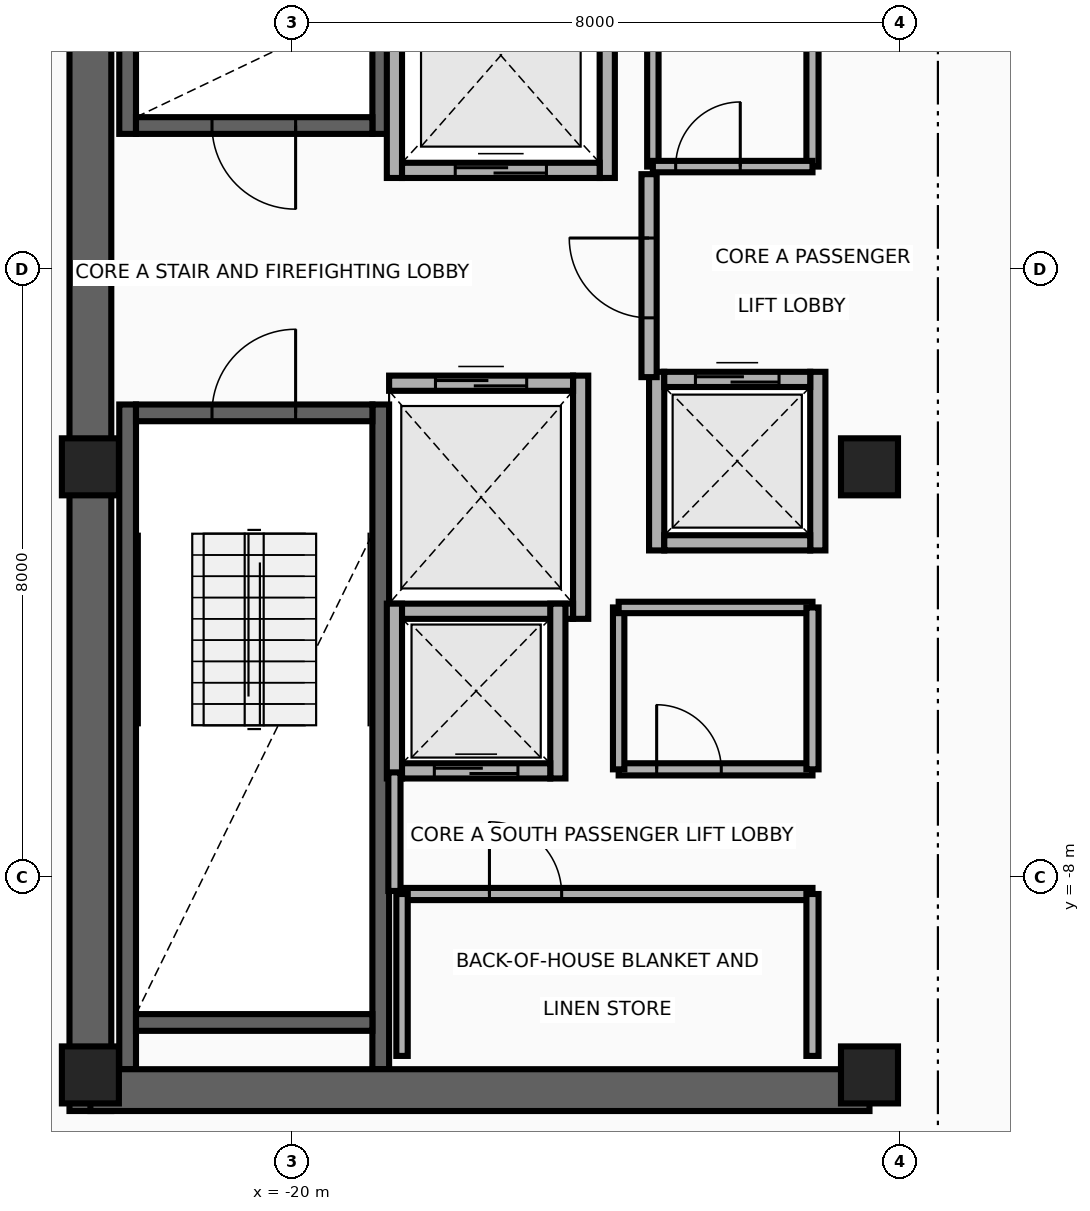
"""IFC4 building model, lengths in metres.
Left out: names, types, materials, properties, quantities, classifications, styles, units other than length and angle.
Written with IfcOpenShell. Run it as: python <this file> out.ifc"""

import sys

from ifc_helpers import new_model, si_unit, direction, frame, frame_2d, origin, origin_2d, place, context, subcontext, project, spatial, rectangle, extrude, source, transform, mapped, element, fill, save


model = new_model("IFC4")
c1 = context("Model", 3, precision=1e-05, world=origin(), true_north=direction((0.0, 1.0)))
c2 = subcontext(c1, "Body", "Model", "MODEL_VIEW")
j1 = project(units=[si_unit("LENGTHUNIT", "METRE"), si_unit("PLANEANGLEUNIT", "RADIAN")], contexts=[c1])
p1 = place(None, origin())
s1 = spatial("IfcSite", under=j1, at=p1, CompositionType="ELEMENT")
p2 = place(p1, origin())
s2 = spatial("IfcBuilding", under=s1, at=p2, CompositionType="ELEMENT")
p3 = place(p2, frame((0.0, 0.0, 290.6)))
s3 = spatial("IfcBuildingStorey", under=s2, at=p3, CompositionType="ELEMENT", Elevation=290.6)
for number, where, z_axis, x_axis in (
    (1, (-22.16, 1.78, 0.0), (0.0, 0.0, 1.0), (0.0, 1.0, 0.0)),
    (2, (-18.83, 1.78, 0.0), (0.0, 0.0, 1.0), (0.0, 1.0, 0.0)),
):
    element("IfcWall", number, at=place(p3, frame(where, z_axis=z_axis, x_axis=x_axis)), inside=s3, PredefinedType="SHEAR", context=c2, shape_type="SweptSolid", body=[
        extrude(rectangle(XDim=8.745, YDim=0.22, at=frame_2d((4.373, 0.0))), origin(), (0.0, 0.0, 1.0), 3.36),
    ])
p4 = place(p3, frame((-22.05, 1.89, 0.0), z_axis=(0.0, 0.0, 1.0), x_axis=(1.0, 0.0, 0.0)))
e3 = element("IfcWall", 3, at=p4, inside=s3, PredefinedType="SHEAR", context=c2, shape_type="SweptSolid", body=[
    extrude(rectangle(XDim=3.11, YDim=0.22, at=frame_2d((1.555, 0.0))), origin(), (0.0, 0.0, 1.0), 3.36),
])
p5 = place(p4, frame((1.0, 0.0, 0.0)))
e4 = element("IfcOpeningElement", 4, at=p5, cuts=e3, PredefinedType="OPENING", context=c2, shape_type="SweptSolid", body=[
    extrude(rectangle(XDim=1.1, YDim=2.15, at=frame_2d((0.55, 1.075))), frame((0.0, 0.125, 0.0), z_axis=(0.0, -1.0, 0.0), x_axis=(1.0, 0.0, 0.0)), (0.0, 0.0, 1.0), 0.25),
])
for number, where, z_axis, x_axis in (
    (5, (-22.16, -10.525, 0.0), (0.0, 0.0, 1.0), (0.0, 1.0, 0.0)),
    (6, (-18.83, -10.525, 0.0), (0.0, 0.0, 1.0), (0.0, 1.0, 0.0)),
):
    element("IfcWall", number, at=place(p3, frame(where, z_axis=z_axis, x_axis=x_axis)), inside=s3, PredefinedType="SHEAR", context=c2, shape_type="SweptSolid", body=[
        extrude(rectangle(XDim=8.745, YDim=0.22, at=frame_2d((4.373, 0.0))), origin(), (0.0, 0.0, 1.0), 3.36),
    ])
p6 = place(p3, frame((-22.05, -9.91, 0.0), z_axis=(0.0, 0.0, 1.0), x_axis=(1.0, 0.0, 0.0)))
e7 = element("IfcWall", 7, at=p6, inside=s3, PredefinedType="SHEAR", context=c2, shape_type="SweptSolid", body=[
    extrude(rectangle(XDim=3.11, YDim=0.22, at=frame_2d((1.555, 0.0))), origin(), (0.0, 0.0, 1.0), 3.36),
])
p7 = place(p3, frame((-22.05, -1.89, 0.0), z_axis=(0.0, 0.0, 1.0), x_axis=(1.0, 0.0, 0.0)))
e8 = element("IfcWall", 8, at=p7, inside=s3, PredefinedType="SHEAR", context=c2, shape_type="SweptSolid", body=[
    extrude(rectangle(XDim=3.11, YDim=0.22, at=frame_2d((1.555, 0.0))), origin(), (0.0, 0.0, 1.0), 3.36),
])
p8 = place(p7, frame((1.0, 0.0, 0.0)))
e9 = element("IfcOpeningElement", 9, at=p8, cuts=e8, PredefinedType="OPENING", context=c2, shape_type="SweptSolid", body=[
    extrude(rectangle(XDim=1.1, YDim=2.15, at=frame_2d((0.55, 1.075))), frame((0.0, 0.125, 0.0), z_axis=(0.0, -1.0, 0.0), x_axis=(1.0, 0.0, 0.0)), (0.0, 0.0, 1.0), 0.25),
])
p9 = place(p3, frame((-22.65, -11.075, 0.0), z_axis=(0.0, 0.0, 1.0), x_axis=(0.0, 1.0, 0.0)))
e10 = element("IfcWall", 10, at=p9, inside=s3, PredefinedType="SHEAR", context=c2, shape_type="SweptSolid", body=[
    extrude(rectangle(XDim=22.15, YDim=0.55, at=frame_2d((11.075, 0.0))), origin(), (0.0, 0.0, 1.0), 3.36),
])
p10 = place(p3, frame((-22.65, -10.8, 0.0), z_axis=(0.0, 0.0, 1.0), x_axis=(1.0, 0.0, 0.0)))
e11 = element("IfcWall", 11, at=p10, inside=s3, PredefinedType="SHEAR", context=c2, shape_type="SweptSolid", body=[
    extrude(rectangle(XDim=10.25, YDim=0.55, at=frame_2d((5.125, 0.0))), origin(), (0.0, 0.0, 1.0), 3.36),
])
m1 = source(origin(), c2, "Body", "SweptSolid", [
    extrude(rectangle(XDim=0.75, YDim=0.75, at=origin_2d()), origin(), (0.0, 0.0, 1.0), 3.6),
])
for number, where, z_axis, x_axis in (
    (12, (-22.65, -10.6, 0.0), (0.0, 0.0, 1.0), (1.0, 0.0, 0.0)),
    (13, (-12.4, -10.6, 0.0), (0.0, 0.0, 1.0), (1.0, 0.0, 0.0)),
    (14, (-22.65, -2.6, 0.0), (0.0, 0.0, 1.0), (1.0, 0.0, 0.0)),
    (15, (-12.4, -2.6, 0.0), (0.0, 0.0, 1.0), (1.0, 0.0, 0.0)),
):
    element("IfcColumn", number, at=place(p3, frame(where, z_axis=z_axis, x_axis=x_axis)), inside=s3, PredefinedType="COLUMN", context=c2, shape_type="MappedRepresentation", body=[
        mapped(m1, transform((0.0, 0.0, 0.0), x_axis=(1.0, 0.0, 0.0), y_axis=(0.0, 1.0, 0.0), z_axis=(0.0, 0.0, 1.0), scale=1.0)),
    ])
for number, where, z_axis, x_axis in (
    (16, (-18.65, 1.2, 0.0), (0.0, 0.0, 1.0), (0.0, 1.0, 0.0)),
    (17, (-15.85, 1.2, 0.0), (0.0, 0.0, 1.0), (0.0, 1.0, 0.0)),
):
    element("IfcWall", number, at=place(p3, frame(where, z_axis=z_axis, x_axis=x_axis)), inside=s3, PredefinedType="MOVABLE", context=c2, shape_type="SweptSolid", body=[
        extrude(rectangle(XDim=3.225, YDim=0.2, at=frame_2d((1.613, 0.0))), origin(), (0.0, 0.0, 1.0), 3.36),
    ])
p11 = place(p3, frame((-18.55, 1.3, 0.0), z_axis=(0.0, 0.0, 1.0), x_axis=(1.0, 0.0, 0.0)))
e18 = element("IfcWall", 18, at=p11, inside=s3, PredefinedType="MOVABLE", context=c2, shape_type="SweptSolid", body=[
    extrude(rectangle(XDim=2.6, YDim=0.2, at=frame_2d((1.3, 0.0))), origin(), (0.0, 0.0, 1.0), 3.36),
])
p12 = place(p11, frame((0.7, 0.0, 0.0)))
e19 = element("IfcOpeningElement", 19, at=p12, cuts=e18, PredefinedType="OPENING", context=c2, shape_type="SweptSolid", body=[
    extrude(rectangle(XDim=1.2, YDim=2.1, at=frame_2d((0.6, 1.05))), frame((0.0, 0.115, 0.0), z_axis=(0.0, -1.0, 0.0), x_axis=(1.0, 0.0, 0.0)), (0.0, 0.0, 1.0), 0.23),
])
p13 = place(p3, frame((-16.2, -4.6, 0.0), z_axis=(0.0, 0.0, 1.0), x_axis=(0.0, 1.0, 0.0)))
e20 = element("IfcWall", 20, at=p13, inside=s3, PredefinedType="MOVABLE", context=c2, shape_type="SweptSolid", body=[
    extrude(rectangle(XDim=3.2, YDim=0.2, at=frame_2d((1.6, 0.0))), origin(), (0.0, 0.0, 1.0), 3.36),
])
p14 = place(p3, frame((-18.72, -4.5, 0.0), z_axis=(0.0, 0.0, 1.0), x_axis=(1.0, 0.0, 0.0)))
e21 = element("IfcWall", 21, at=p14, inside=s3, PredefinedType="MOVABLE", context=c2, shape_type="SweptSolid", body=[
    extrude(rectangle(XDim=2.42, YDim=0.2, at=frame_2d((1.21, 0.0))), origin(), (0.0, 0.0, 1.0), 3.36),
])
p15 = place(p3, frame((-18.72, -1.5, 0.0), z_axis=(0.0, 0.0, 1.0), x_axis=(1.0, 0.0, 0.0)))
e22 = element("IfcWall", 22, at=p15, inside=s3, PredefinedType="MOVABLE", context=c2, shape_type="SweptSolid", body=[
    extrude(rectangle(XDim=2.42, YDim=0.2, at=frame_2d((1.21, 0.0))), origin(), (0.0, 0.0, 1.0), 3.36),
])
p16 = place(p15, frame((0.61, 0.0, 0.0)))
e23 = element("IfcOpeningElement", 23, at=p16, cuts=e22, PredefinedType="OPENING", context=c2, shape_type="SweptSolid", body=[
    extrude(rectangle(XDim=1.2, YDim=2.1, at=frame_2d((0.6, 1.05))), frame((0.0, 0.115, 0.0), z_axis=(0.0, -1.0, 0.0), x_axis=(1.0, 0.0, 0.0)), (0.0, 0.0, 1.0), 0.23),
])
for number, where, z_axis, x_axis in (
    (24, (-18.65, -6.7, 0.0), (0.0, 0.0, 1.0), (0.0, 1.0, 0.0)),
    (25, (-16.5, -6.7, 0.0), (0.0, 0.0, 1.0), (0.0, 1.0, 0.0)),
):
    element("IfcWall", number, at=place(p3, frame(where, z_axis=z_axis, x_axis=x_axis)), inside=s3, PredefinedType="MOVABLE", context=c2, shape_type="SweptSolid", body=[
        extrude(rectangle(XDim=2.3, YDim=0.2, at=frame_2d((1.15, 0.0))), origin(), (0.0, 0.0, 1.0), 3.36),
    ])
p17 = place(p3, frame((-18.55, -6.6, 0.0), z_axis=(0.0, 0.0, 1.0), x_axis=(1.0, 0.0, 0.0)))
e26 = element("IfcWall", 26, at=p17, inside=s3, PredefinedType="MOVABLE", context=c2, shape_type="SweptSolid", body=[
    extrude(rectangle(XDim=1.95, YDim=0.2, at=frame_2d((0.975, 0.0))), origin(), (0.0, 0.0, 1.0), 3.36),
])
p18 = place(p17, frame((0.425, 0.0, 0.0)))
e27 = element("IfcOpeningElement", 27, at=p18, cuts=e26, PredefinedType="OPENING", context=c2, shape_type="SweptSolid", body=[
    extrude(rectangle(XDim=1.1, YDim=2.1, at=frame_2d((0.55, 1.05))), frame((0.0, 0.115, 0.0), z_axis=(0.0, -1.0, 0.0), x_axis=(1.0, 0.0, 0.0)), (0.0, 0.0, 1.0), 0.23),
])
for number, where, z_axis, x_axis in (
    (28, (-15.2, -3.7, 0.0), (0.0, 0.0, 1.0), (0.0, 1.0, 0.0)),
    (29, (-13.08, -3.7, 0.0), (0.0, 0.0, 1.0), (0.0, 1.0, 0.0)),
):
    element("IfcWall", number, at=place(p3, frame(where, z_axis=z_axis, x_axis=x_axis)), inside=s3, PredefinedType="MOVABLE", context=c2, shape_type="SweptSolid", body=[
        extrude(rectangle(XDim=2.35, YDim=0.2, at=frame_2d((1.175, 0.0))), origin(), (0.0, 0.0, 1.0), 3.36),
    ])
p19 = place(p3, frame((-15.1, -3.6, 0.0), z_axis=(0.0, 0.0, 1.0), x_axis=(1.0, 0.0, 0.0)))
e30 = element("IfcWall", 30, at=p19, inside=s3, PredefinedType="MOVABLE", context=c2, shape_type="SweptSolid", body=[
    extrude(rectangle(XDim=1.92, YDim=0.2, at=frame_2d((0.96, 0.0))), origin(), (0.0, 0.0, 1.0), 3.36),
])
p20 = place(p3, frame((-15.1, -1.45, 0.0), z_axis=(0.0, 0.0, 1.0), x_axis=(1.0, 0.0, 0.0)))
e31 = element("IfcWall", 31, at=p20, inside=s3, PredefinedType="MOVABLE", context=c2, shape_type="SweptSolid", body=[
    extrude(rectangle(XDim=1.92, YDim=0.2, at=frame_2d((0.96, 0.0))), origin(), (0.0, 0.0, 1.0), 3.36),
])
p21 = place(p20, frame((0.41, 0.0, 0.0)))
e32 = element("IfcOpeningElement", 32, at=p21, cuts=e31, PredefinedType="OPENING", context=c2, shape_type="SweptSolid", body=[
    extrude(rectangle(XDim=1.1, YDim=2.1, at=frame_2d((0.55, 1.05))), frame((0.0, 0.115, 0.0), z_axis=(0.0, -1.0, 0.0), x_axis=(1.0, 0.0, 0.0)), (0.0, 0.0, 1.0), 0.23),
])
p22 = place(p3, frame((-15.3, -1.42, 0.0), z_axis=(0.0, 0.0, 1.0), x_axis=(0.0, 1.0, 0.0)))
e33 = element("IfcWall", 33, at=p22, inside=s3, PredefinedType="PARTITIONING", context=c2, shape_type="SweptSolid", body=[
    extrude(rectangle(XDim=2.67, YDim=0.2, at=frame_2d((1.335, 0.0))), origin(), (0.0, 0.0, 1.0), 3.36),
])
p23 = place(p22, frame((0.78, 0.0, 0.0)))
e34 = element("IfcOpeningElement", 34, at=p23, cuts=e33, PredefinedType="OPENING", context=c2, shape_type="SweptSolid", body=[
    extrude(rectangle(XDim=1.05, YDim=2.15, at=frame_2d((0.525, 1.075))), frame((0.0, 0.115, 0.0), z_axis=(0.0, -1.0, 0.0), x_axis=(1.0, 0.0, 0.0)), (0.0, 0.0, 1.0), 0.23),
])
p24 = place(p3, frame((-18.65, -8.18, 0.0), z_axis=(0.0, 0.0, 1.0), x_axis=(0.0, 1.0, 0.0)))
e35 = element("IfcWall", 35, at=p24, inside=s3, PredefinedType="PARTITIONING", context=c2, shape_type="SweptSolid", body=[
    extrude(rectangle(XDim=1.56, YDim=0.16, at=frame_2d((0.78, 0.0))), origin(), (0.0, 0.0, 1.0), 3.36),
])
p25 = place(p3, frame((-18.55, -8.22, 0.0), z_axis=(0.0, 0.0, 1.0), x_axis=(1.0, 0.0, 0.0)))
e36 = element("IfcWall", 36, at=p25, inside=s3, PredefinedType="PARTITIONING", context=c2, shape_type="SweptSolid", body=[
    extrude(rectangle(XDim=5.4, YDim=0.16, at=frame_2d((2.7, 0.0))), origin(), (0.0, 0.0, 1.0), 3.36),
])
p26 = place(p25, frame((1.15, 0.0, 0.0)))
e37 = element("IfcOpeningElement", 37, at=p26, cuts=e36, PredefinedType="OPENING", context=c2, shape_type="SweptSolid", body=[
    extrude(rectangle(XDim=0.95, YDim=2.15, at=frame_2d((0.475, 1.075))), frame((0.0, 0.095, 0.0), z_axis=(0.0, -1.0, 0.0), x_axis=(1.0, 0.0, 0.0)), (0.0, 0.0, 1.0), 0.19),
])
p27 = place(p3, frame((-18.55, -10.35, 0.0), z_axis=(0.0, 0.0, 1.0), x_axis=(0.0, 1.0, 0.0)))
e38 = element("IfcWall", 38, at=p27, inside=s3, PredefinedType="PARTITIONING", context=c2, shape_type="SweptSolid", body=[
    extrude(rectangle(XDim=2.13, YDim=0.15, at=frame_2d((1.065, 0.0))), origin(), (0.0, 0.0, 1.0), 3.36),
])
p28 = place(p3, frame((-13.15, -10.35, 0.0), z_axis=(0.0, 0.0, 1.0), x_axis=(0.0, 1.0, 0.0)))
e39 = element("IfcWall", 39, at=p28, inside=s3, PredefinedType="PARTITIONING", context=c2, shape_type="SweptSolid", body=[
    extrude(rectangle(XDim=2.13, YDim=0.16, at=frame_2d((1.065, 0.0))), origin(), (0.0, 0.0, 1.0), 3.36),
])
p29 = place(p3, frame((-15.7, -6.58, 0.0), z_axis=(0.0, 0.0, 1.0), x_axis=(1.0, 0.0, 0.0)))
e40 = element("IfcWall", 40, at=p29, inside=s3, PredefinedType="PARTITIONING", context=c2, shape_type="SweptSolid", body=[
    extrude(rectangle(XDim=2.55, YDim=0.16, at=frame_2d((1.275, 0.0))), origin(), (0.0, 0.0, 1.0), 3.36),
])
p30 = place(p29, frame((0.5, 0.0, 0.0)))
e41 = element("IfcOpeningElement", 41, at=p30, cuts=e40, PredefinedType="OPENING", context=c2, shape_type="SweptSolid", body=[
    extrude(rectangle(XDim=0.85, YDim=2.05, at=frame_2d((0.425, 1.025))), frame((0.0, 0.095, 0.0), z_axis=(0.0, -1.0, 0.0), x_axis=(1.0, 0.0, 0.0)), (0.0, 0.0, 1.0), 0.19),
])
p31 = place(p3, frame((-15.7, -6.58, 0.0), z_axis=(0.0, 0.0, 1.0), x_axis=(0.0, 1.0, 0.0)))
e42 = element("IfcWall", 42, at=p31, inside=s3, PredefinedType="PARTITIONING", context=c2, shape_type="SweptSolid", body=[
    extrude(rectangle(XDim=2.13, YDim=0.15, at=frame_2d((1.065, 0.0))), origin(), (0.0, 0.0, 1.0), 3.36),
])
p32 = place(p3, frame((-15.7, -4.45, 0.0), z_axis=(0.0, 0.0, 1.0), x_axis=(1.0, 0.0, 0.0)))
e43 = element("IfcWall", 43, at=p32, inside=s3, PredefinedType="PARTITIONING", context=c2, shape_type="SweptSolid", body=[
    extrude(rectangle(XDim=2.55, YDim=0.15, at=frame_2d((1.275, 0.0))), origin(), (0.0, 0.0, 1.0), 3.36),
])
p33 = place(p3, frame((-13.15, -6.58, 0.0), z_axis=(0.0, 0.0, 1.0), x_axis=(0.0, 1.0, 0.0)))
e44 = element("IfcWall", 44, at=p33, inside=s3, PredefinedType="PARTITIONING", context=c2, shape_type="SweptSolid", body=[
    extrude(rectangle(XDim=2.13, YDim=0.16, at=frame_2d((1.065, 0.0))), origin(), (0.0, 0.0, 1.0), 3.36),
])
p34 = place(p3, frame((-13.15, 1.35, 0.0), z_axis=(0.0, 0.0, 1.0), x_axis=(0.0, 1.0, 0.0)))
e45 = element("IfcWall", 45, at=p34, inside=s3, PredefinedType="PARTITIONING", context=c2, shape_type="SweptSolid", body=[
    extrude(rectangle(XDim=1.95, YDim=0.16, at=frame_2d((0.975, 0.0))), origin(), (0.0, 0.0, 1.0), 3.36),
])
p35 = place(p3, frame((-15.25, 1.35, 0.0), z_axis=(0.0, 0.0, 1.0), x_axis=(0.0, 1.0, 0.0)))
e46 = element("IfcWall", 46, at=p35, inside=s3, PredefinedType="PARTITIONING", context=c2, shape_type="SweptSolid", body=[
    extrude(rectangle(XDim=1.95, YDim=0.15, at=frame_2d((0.975, 0.0))), origin(), (0.0, 0.0, 1.0), 3.36),
])
p36 = place(p3, frame((-15.25, 1.35, 0.0), z_axis=(0.0, 0.0, 1.0), x_axis=(1.0, 0.0, 0.0)))
e47 = element("IfcWall", 47, at=p36, inside=s3, PredefinedType="PARTITIONING", context=c2, shape_type="SweptSolid", body=[
    extrude(rectangle(XDim=2.1, YDim=0.15, at=frame_2d((1.05, 0.0))), origin(), (0.0, 0.0, 1.0), 3.36),
])
p37 = place(p36, frame((0.3, 0.0, 0.0)))
e48 = element("IfcOpeningElement", 48, at=p37, cuts=e47, PredefinedType="OPENING", context=c2, shape_type="SweptSolid", body=[
    extrude(rectangle(XDim=0.85, YDim=2.05, at=frame_2d((0.425, 1.025))), frame((0.0, 0.09, 0.0), z_axis=(0.0, -1.0, 0.0), x_axis=(1.0, 0.0, 0.0)), (0.0, 0.0, 1.0), 0.18),
])
p38 = place(p12, origin())
e49 = element("IfcDoor", 49, at=p38, inside=s3, OperationType="DOUBLE_DOOR_SLIDING", PredefinedType="DOOR", context=c2, shape_type="SweptSolid", body=[
    extrude(rectangle(XDim=1.2, YDim=2.1, at=frame_2d((0.6, 1.05))), frame((0.0, 0.025, 0.0), z_axis=(0.0, -1.0, 0.0), x_axis=(1.0, 0.0, 0.0)), (0.0, 0.0, 1.0), 0.05),
])
fill(e19, e49)
p39 = place(p16, origin())
e50 = element("IfcDoor", 50, at=p39, inside=s3, OperationType="DOUBLE_DOOR_SLIDING", PredefinedType="DOOR", context=c2, shape_type="SweptSolid", body=[
    extrude(rectangle(XDim=1.2, YDim=2.1, at=frame_2d((0.6, 1.05))), frame((0.0, 0.025, 0.0), z_axis=(0.0, -1.0, 0.0), x_axis=(1.0, 0.0, 0.0)), (0.0, 0.0, 1.0), 0.05),
])
fill(e23, e50)
p40 = place(p18, origin())
e51 = element("IfcDoor", 51, at=p40, inside=s3, OperationType="DOUBLE_DOOR_SLIDING", PredefinedType="DOOR", context=c2, shape_type="SweptSolid", body=[
    extrude(rectangle(XDim=1.1, YDim=2.1, at=frame_2d((0.55, 1.05))), frame((0.0, 0.025, 0.0), z_axis=(0.0, -1.0, 0.0), x_axis=(1.0, 0.0, 0.0)), (0.0, 0.0, 1.0), 0.05),
])
fill(e27, e51)
p41 = place(p21, origin())
e52 = element("IfcDoor", 52, at=p41, inside=s3, OperationType="DOUBLE_DOOR_SLIDING", PredefinedType="DOOR", context=c2, shape_type="SweptSolid", body=[
    extrude(rectangle(XDim=1.1, YDim=2.1, at=frame_2d((0.55, 1.05))), frame((0.0, 0.025, 0.0), z_axis=(0.0, -1.0, 0.0), x_axis=(1.0, 0.0, 0.0)), (0.0, 0.0, 1.0), 0.05),
])
fill(e32, e52)
p42 = place(p23, origin())
e53 = element("IfcDoor", 53, at=p42, inside=s3, OperationType="SINGLE_SWING_RIGHT", PredefinedType="DOOR", context=c2, shape_type="SweptSolid", body=[
    extrude(rectangle(XDim=1.05, YDim=2.15, at=frame_2d((0.525, 1.075))), frame((0.0, 0.025, 0.0), z_axis=(0.0, -1.0, 0.0), x_axis=(1.0, 0.0, 0.0)), (0.0, 0.0, 1.0), 0.05),
])
fill(e34, e53)
p43 = place(p5, frame((1.1, 0.0, 0.0), z_axis=(0.0, 0.0, 1.0), x_axis=(-1.0, 0.0, 0.0)))
e54 = element("IfcDoor", 54, at=p43, inside=s3, OperationType="SINGLE_SWING_LEFT", PredefinedType="DOOR", context=c2, shape_type="SweptSolid", body=[
    extrude(rectangle(XDim=1.1, YDim=2.15, at=frame_2d((0.55, 1.075))), frame((0.0, 0.025, 0.0), z_axis=(0.0, -1.0, 0.0), x_axis=(1.0, 0.0, 0.0)), (0.0, 0.0, 1.0), 0.05),
])
fill(e4, e54)
p44 = place(p8, origin())
e55 = element("IfcDoor", 55, at=p44, inside=s3, OperationType="SINGLE_SWING_RIGHT", PredefinedType="DOOR", context=c2, shape_type="SweptSolid", body=[
    extrude(rectangle(XDim=1.1, YDim=2.15, at=frame_2d((0.55, 1.075))), frame((0.0, 0.025, 0.0), z_axis=(0.0, -1.0, 0.0), x_axis=(1.0, 0.0, 0.0)), (0.0, 0.0, 1.0), 0.05),
])
fill(e9, e55)
p45 = place(p26, origin())
e56 = element("IfcDoor", 56, at=p45, inside=s3, OperationType="SINGLE_SWING_LEFT", PredefinedType="DOOR", context=c2, shape_type="SweptSolid", body=[
    extrude(rectangle(XDim=0.95, YDim=2.15, at=frame_2d((0.475, 1.075))), frame((0.0, 0.025, 0.0), z_axis=(0.0, -1.0, 0.0), x_axis=(1.0, 0.0, 0.0)), (0.0, 0.0, 1.0), 0.05),
])
fill(e37, e56)
p46 = place(p30, origin())
e57 = element("IfcDoor", 57, at=p46, inside=s3, OperationType="SINGLE_SWING_RIGHT", PredefinedType="DOOR", context=c2, shape_type="SweptSolid", body=[
    extrude(rectangle(XDim=0.85, YDim=2.05, at=frame_2d((0.425, 1.025))), frame((0.0, 0.025, 0.0), z_axis=(0.0, -1.0, 0.0), x_axis=(1.0, 0.0, 0.0)), (0.0, 0.0, 1.0), 0.05),
])
fill(e41, e57)
p47 = place(p37, origin())
e58 = element("IfcDoor", 58, at=p47, inside=s3, OperationType="SINGLE_SWING_LEFT", PredefinedType="DOOR", context=c2, shape_type="SweptSolid", body=[
    extrude(rectangle(XDim=0.85, YDim=2.05, at=frame_2d((0.425, 1.025))), frame((0.0, 0.025, 0.0), z_axis=(0.0, -1.0, 0.0), x_axis=(1.0, 0.0, 0.0)), (0.0, 0.0, 1.0), 0.05),
])
fill(e48, e58)
save(model, sys.argv[1])
